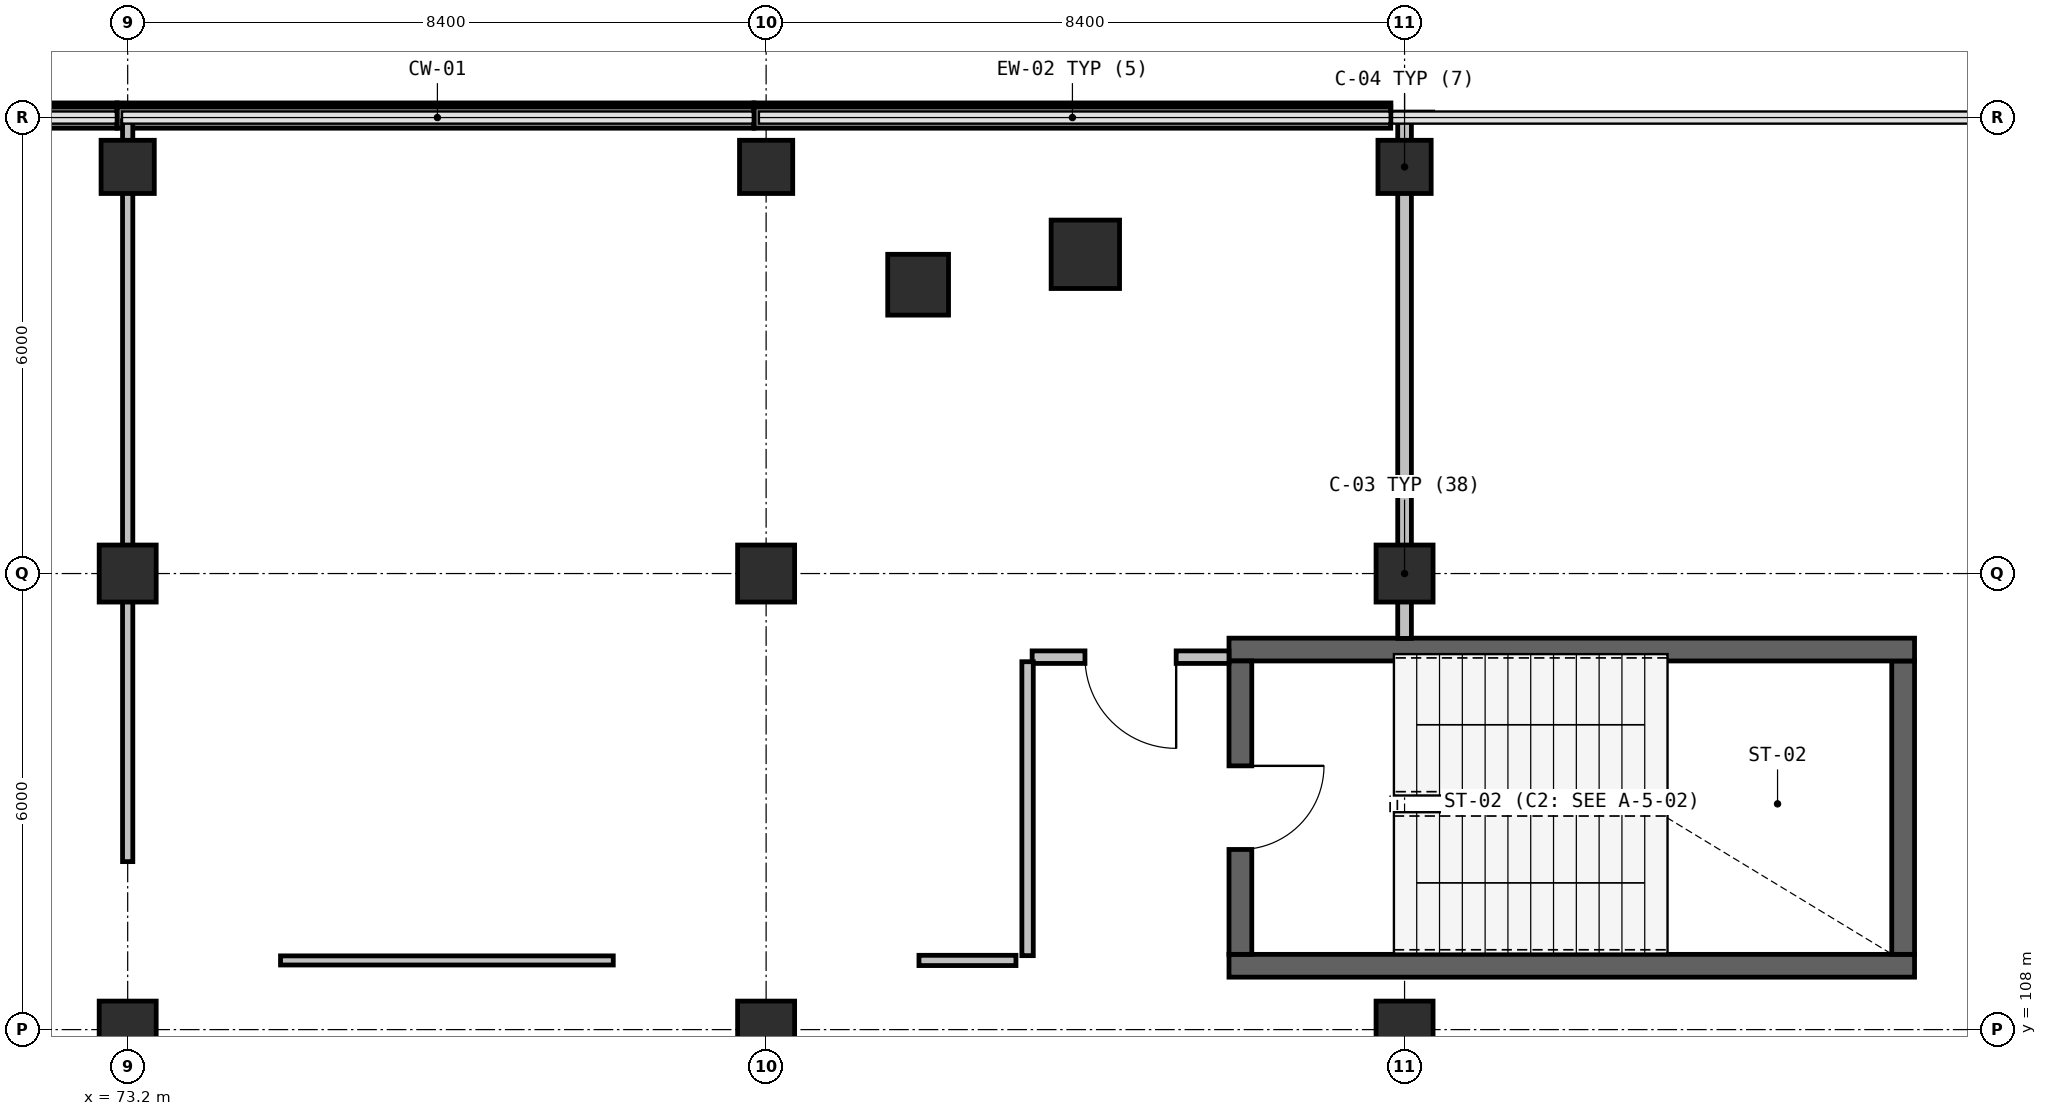
"""IFC4 building model, lengths in metres.
Left out: names, types, materials, properties, quantities, classifications, styles, units other than length and angle.
Written with IfcOpenShell. Run it as: python <this file> out.ifc"""

import sys

from ifc_helpers import new_model, si_unit, direction, frame, frame_2d, origin, origin_2d, place, context, subcontext, project, spatial, rectangle, extrude, element, fill, save


model = new_model("IFC4")
c1 = context("Model", 3, precision=1e-05, world=origin(), true_north=direction((0.0, 1.0)))
c2 = subcontext(c1, "Body", "Model", "MODEL_VIEW")
j1 = project(units=[si_unit("LENGTHUNIT", "METRE"), si_unit("PLANEANGLEUNIT", "RADIAN")], contexts=[c1])
p1 = place(None, origin())
s1 = spatial("IfcSite", under=j1, at=p1, CompositionType="ELEMENT")
p2 = place(p1, origin())
s2 = spatial("IfcBuilding", under=s1, at=p2, CompositionType="ELEMENT")
p3 = place(p2, frame((0.0, 0.0, 10.2)))
s3 = spatial("IfcBuildingStorey", under=s2, at=p3, CompositionType="ELEMENT", Elevation=10.2)
p4 = place(p3, frame((83.6, 117.8, 0.0), z_axis=(0.0, 0.0, 1.0), x_axis=(1.0, 0.0, 0.0)))
e1 = element("IfcColumn", 1, at=p4, inside=s3, PredefinedType="COLUMN", context=c2, shape_type="SweptSolid", body=[
    extrude(rectangle(XDim=0.8, YDim=0.8, at=origin_2d()), origin(), (0.0, 0.0, 1.0), 4.8),
])
p5 = place(p3, frame((85.8, 118.2, 0.0), z_axis=(0.0, 0.0, 1.0), x_axis=(1.0, 0.0, 0.0)))
e2 = element("IfcColumn", 2, at=p5, inside=s3, PredefinedType="COLUMN", context=c2, shape_type="SweptSolid", body=[
    extrude(rectangle(XDim=0.9, YDim=0.9, at=origin_2d()), origin(), (0.0, 0.0, 1.0), 4.8),
])
for number, where, z_axis, x_axis in (
    (3, (73.2, 108.0, 0.0), (0.0, 0.0, 1.0), (1.0, 0.0, 0.0)),
    (4, (73.2, 114.0, 0.0), (0.0, 0.0, 1.0), (1.0, 0.0, 0.0)),
):
    element("IfcColumn", number, at=place(p3, frame(where, z_axis=z_axis, x_axis=x_axis)), inside=s3, PredefinedType="COLUMN", context=c2, shape_type="SweptSolid", body=[
        extrude(rectangle(XDim=0.75, YDim=0.75, at=origin_2d()), origin(), (0.0, 0.0, 1.0), 4.8),
    ])
p6 = place(p3, frame((73.2, 119.35, 0.0), z_axis=(0.0, 0.0, 1.0), x_axis=(1.0, 0.0, 0.0)))
e5 = element("IfcColumn", 5, at=p6, inside=s3, PredefinedType="COLUMN", context=c2, shape_type="SweptSolid", body=[
    extrude(rectangle(XDim=0.7, YDim=0.7, at=origin_2d()), origin(), (0.0, 0.0, 1.0), 4.8),
])
for number, where, z_axis, x_axis in (
    (6, (81.6, 108.0, 0.0), (0.0, 0.0, 1.0), (1.0, 0.0, 0.0)),
    (7, (81.6, 114.0, 0.0), (0.0, 0.0, 1.0), (1.0, 0.0, 0.0)),
):
    element("IfcColumn", number, at=place(p3, frame(where, z_axis=z_axis, x_axis=x_axis)), inside=s3, PredefinedType="COLUMN", context=c2, shape_type="SweptSolid", body=[
        extrude(rectangle(XDim=0.75, YDim=0.75, at=origin_2d()), origin(), (0.0, 0.0, 1.0), 4.8),
    ])
p7 = place(p3, frame((81.6, 119.35, 0.0), z_axis=(0.0, 0.0, 1.0), x_axis=(1.0, 0.0, 0.0)))
e8 = element("IfcColumn", 8, at=p7, inside=s3, PredefinedType="COLUMN", context=c2, shape_type="SweptSolid", body=[
    extrude(rectangle(XDim=0.7, YDim=0.7, at=origin_2d()), origin(), (0.0, 0.0, 1.0), 4.8),
])
for number, where, z_axis, x_axis in (
    (9, (90.0, 108.0, 0.0), (0.0, 0.0, 1.0), (1.0, 0.0, 0.0)),
    (10, (90.0, 114.0, 0.0), (0.0, 0.0, 1.0), (1.0, 0.0, 0.0)),
):
    element("IfcColumn", number, at=place(p3, frame(where, z_axis=z_axis, x_axis=x_axis)), inside=s3, PredefinedType="COLUMN", context=c2, shape_type="SweptSolid", body=[
        extrude(rectangle(XDim=0.75, YDim=0.75, at=origin_2d()), origin(), (0.0, 0.0, 1.0), 4.8),
    ])
p8 = place(p3, frame((90.0, 119.35, 0.0), z_axis=(0.0, 0.0, 1.0), x_axis=(1.0, 0.0, 0.0)))
e11 = element("IfcColumn", 11, at=p8, inside=s3, PredefinedType="COLUMN", context=c2, shape_type="SweptSolid", body=[
    extrude(rectangle(XDim=0.7, YDim=0.7, at=origin_2d()), origin(), (0.0, 0.0, 1.0), 4.8),
])
p9 = place(p3, frame((64.682, 119.999, 0.0), z_axis=(0.0, 0.0, 1.0), x_axis=(1.0, 0.0, 0.0)))
e12 = element("IfcWall", 12, at=p9, inside=s3, PredefinedType="SOLIDWALL", context=c2, shape_type="SweptSolid", body=[
    extrude(rectangle(XDim=8.376, YDim=0.28, at=frame_2d((4.188, 0.0))), origin(), (0.0, 0.0, 1.0), 0.94),
])
p10 = place(p3, frame((73.062, 119.999, 0.0), z_axis=(0.0, 0.0, 1.0), x_axis=(1.0, 0.0, 0.0)))
e13 = element("IfcWall", 13, at=p10, inside=s3, PredefinedType="SOLIDWALL", context=c2, shape_type="SweptSolid", body=[
    extrude(rectangle(XDim=8.376, YDim=0.28, at=frame_2d((4.188, 0.0))), origin(), (0.0, 0.0, 1.0), 0.94),
])
p11 = place(p3, frame((81.442, 119.999, 0.0), z_axis=(0.0, 0.0, 1.0), x_axis=(1.0, 0.0, 0.0)))
e14 = element("IfcWall", 14, at=p11, inside=s3, PredefinedType="SOLIDWALL", context=c2, shape_type="SweptSolid", body=[
    extrude(rectangle(XDim=8.376, YDim=0.28, at=frame_2d((4.188, 0.0))), origin(), (0.0, 0.0, 1.0), 0.94),
])
p12 = place(p3, frame((87.69, 108.84, 0.0), z_axis=(0.0, 0.0, 1.0), x_axis=(1.0, 0.0, 0.0)))
e15 = element("IfcWall", 15, at=p12, inside=s3, PredefinedType="SHEAR", context=c2, shape_type="SweptSolid", body=[
    extrude(rectangle(XDim=9.02, YDim=0.3, at=frame_2d((4.51, 0.0))), origin(), (0.0, 0.0, 1.0), 4.46),
])
p13 = place(p3, frame((96.56, 108.99, 0.0), z_axis=(0.0, 0.0, 1.0), x_axis=(0.0, 1.0, 0.0)))
e16 = element("IfcWall", 16, at=p13, inside=s3, PredefinedType="SHEAR", context=c2, shape_type="SweptSolid", body=[
    extrude(rectangle(XDim=3.86, YDim=0.3, at=frame_2d((1.93, 0.0))), origin(), (0.0, 0.0, 1.0), 4.46),
])
p14 = place(p3, frame((96.71, 113.0, 0.0), z_axis=(0.0, 0.0, 1.0), x_axis=(-1.0, 0.0, 0.0)))
e17 = element("IfcWall", 17, at=p14, inside=s3, PredefinedType="SHEAR", context=c2, shape_type="SweptSolid", body=[
    extrude(rectangle(XDim=9.02, YDim=0.3, at=frame_2d((4.51, 0.0))), origin(), (0.0, 0.0, 1.0), 4.46),
])
p15 = place(p3, frame((87.84, 112.85, 0.0), z_axis=(0.0, 0.0, 1.0), x_axis=(0.0, -1.0, 0.0)))
e18 = element("IfcWall", 18, at=p15, inside=s3, PredefinedType="SHEAR", context=c2, shape_type="SweptSolid", body=[
    extrude(rectangle(XDim=3.86, YDim=0.3, at=frame_2d((1.93, 0.0))), origin(), (0.0, 0.0, 1.0), 4.46),
])
p16 = place(p15, frame((1.38, 0.0, 0.0)))
e19 = element("IfcOpeningElement", 19, at=p16, cuts=e18, PredefinedType="OPENING", context=c2, shape_type="SweptSolid", body=[
    extrude(rectangle(XDim=1.1, YDim=2.15, at=frame_2d((0.55, 1.075))), frame((0.0, 0.16, 0.0), z_axis=(0.0, -1.0, 0.0), x_axis=(1.0, 0.0, 0.0)), (0.0, 0.0, 1.0), 0.32),
])
p17 = place(p3, frame((73.2, 119.957, 0.0), z_axis=(0.0, 0.0, 1.0), x_axis=(0.0, -1.0, 0.0)))
e20 = element("IfcWall", 20, at=p17, inside=s3, PredefinedType="PARTITIONING", context=c2, shape_type="SweptSolid", body=[
    extrude(rectangle(XDim=9.747, YDim=0.135, at=frame_2d((4.874, 0.0))), origin(), (0.0, 0.0, 1.0), 3.81),
])
p18 = place(p3, frame((90.0, 119.988, 0.0), z_axis=(0.0, 0.0, 1.0), x_axis=(0.0, -1.0, 0.0)))
e21 = element("IfcWall", 21, at=p18, inside=s3, PredefinedType="PARTITIONING", context=c2, shape_type="SweptSolid", body=[
    extrude(rectangle(XDim=6.841, YDim=0.18, at=frame_2d((3.42, 0.0))), origin(), (0.0, 0.0, 1.0), 3.81),
])
p19 = place(p3, frame((87.69, 112.9, 0.0), z_axis=(0.0, 0.0, 1.0), x_axis=(-1.0, 0.0, 0.0)))
e22 = element("IfcWall", 22, at=p19, inside=s3, PredefinedType="PARTITIONING", context=c2, shape_type="SweptSolid", body=[
    extrude(rectangle(XDim=2.59, YDim=0.165, at=frame_2d((1.295, 0.0))), origin(), (0.0, 0.0, 1.0), 4.46),
])
p20 = place(p19, frame((0.695, 0.0, 0.0)))
e23 = element("IfcOpeningElement", 23, at=p20, cuts=e22, PredefinedType="OPENING", context=c2, shape_type="SweptSolid", body=[
    extrude(rectangle(XDim=1.2, YDim=2.15, at=frame_2d((0.6, 1.075))), frame((0.0, 0.093, 0.0), z_axis=(0.0, -1.0, 0.0), x_axis=(1.0, 0.0, 0.0)), (0.0, 0.0, 1.0), 0.185),
])
p21 = place(p3, frame((85.04, 112.84, 0.0), z_axis=(0.0, 0.0, 1.0), x_axis=(0.0, -1.0, 0.0)))
e24 = element("IfcWall", 24, at=p21, inside=s3, PredefinedType="PARTITIONING", context=c2, shape_type="SweptSolid", body=[
    extrude(rectangle(XDim=3.867, YDim=0.15, at=frame_2d((1.934, 0.0))), origin(), (0.0, 0.0, 1.0), 4.46),
])
p22 = place(p3, frame((84.887, 108.91, 0.0), z_axis=(0.0, 0.0, 1.0), x_axis=(-1.0, 0.0, 0.0)))
e25 = element("IfcWall", 25, at=p22, inside=s3, PredefinedType="PARTITIONING", context=c2, shape_type="SweptSolid", body=[
    extrude(rectangle(XDim=1.276, YDim=0.135, at=frame_2d((0.638, 0.0))), origin(), (0.0, 0.0, 1.0), 4.46),
])
p23 = place(p3, frame((79.589, 108.91, 0.0), z_axis=(0.0, 0.0, 1.0), x_axis=(-1.0, 0.0, 0.0)))
e26 = element("IfcWall", 26, at=p23, inside=s3, PredefinedType="PARTITIONING", context=c2, shape_type="SweptSolid", body=[
    extrude(rectangle(XDim=4.378, YDim=0.12, at=frame_2d((2.189, 0.0))), origin(), (0.0, 0.0, 1.0), 4.46),
])
p24 = place(p16, origin())
e27 = element("IfcDoor", 27, at=p24, inside=s3, OperationType="SINGLE_SWING_LEFT", PredefinedType="DOOR", context=c2, shape_type="SweptSolid", body=[
    extrude(rectangle(XDim=1.1, YDim=2.15, at=frame_2d((0.55, 1.075))), frame((0.0, 0.025, 0.0), z_axis=(0.0, -1.0, 0.0), x_axis=(1.0, 0.0, 0.0)), (0.0, 0.0, 1.0), 0.05),
])
fill(e19, e27)
p25 = place(p20, origin())
e28 = element("IfcDoor", 28, at=p25, inside=s3, OperationType="SINGLE_SWING_LEFT", PredefinedType="DOOR", context=c2, shape_type="SweptSolid", body=[
    extrude(rectangle(XDim=1.2, YDim=2.15, at=frame_2d((0.6, 1.075))), frame((0.0, 0.025, 0.0), z_axis=(0.0, -1.0, 0.0), x_axis=(1.0, 0.0, 0.0)), (0.0, 0.0, 1.0), 0.05),
])
fill(e23, e28)
save(model, sys.argv[1])
